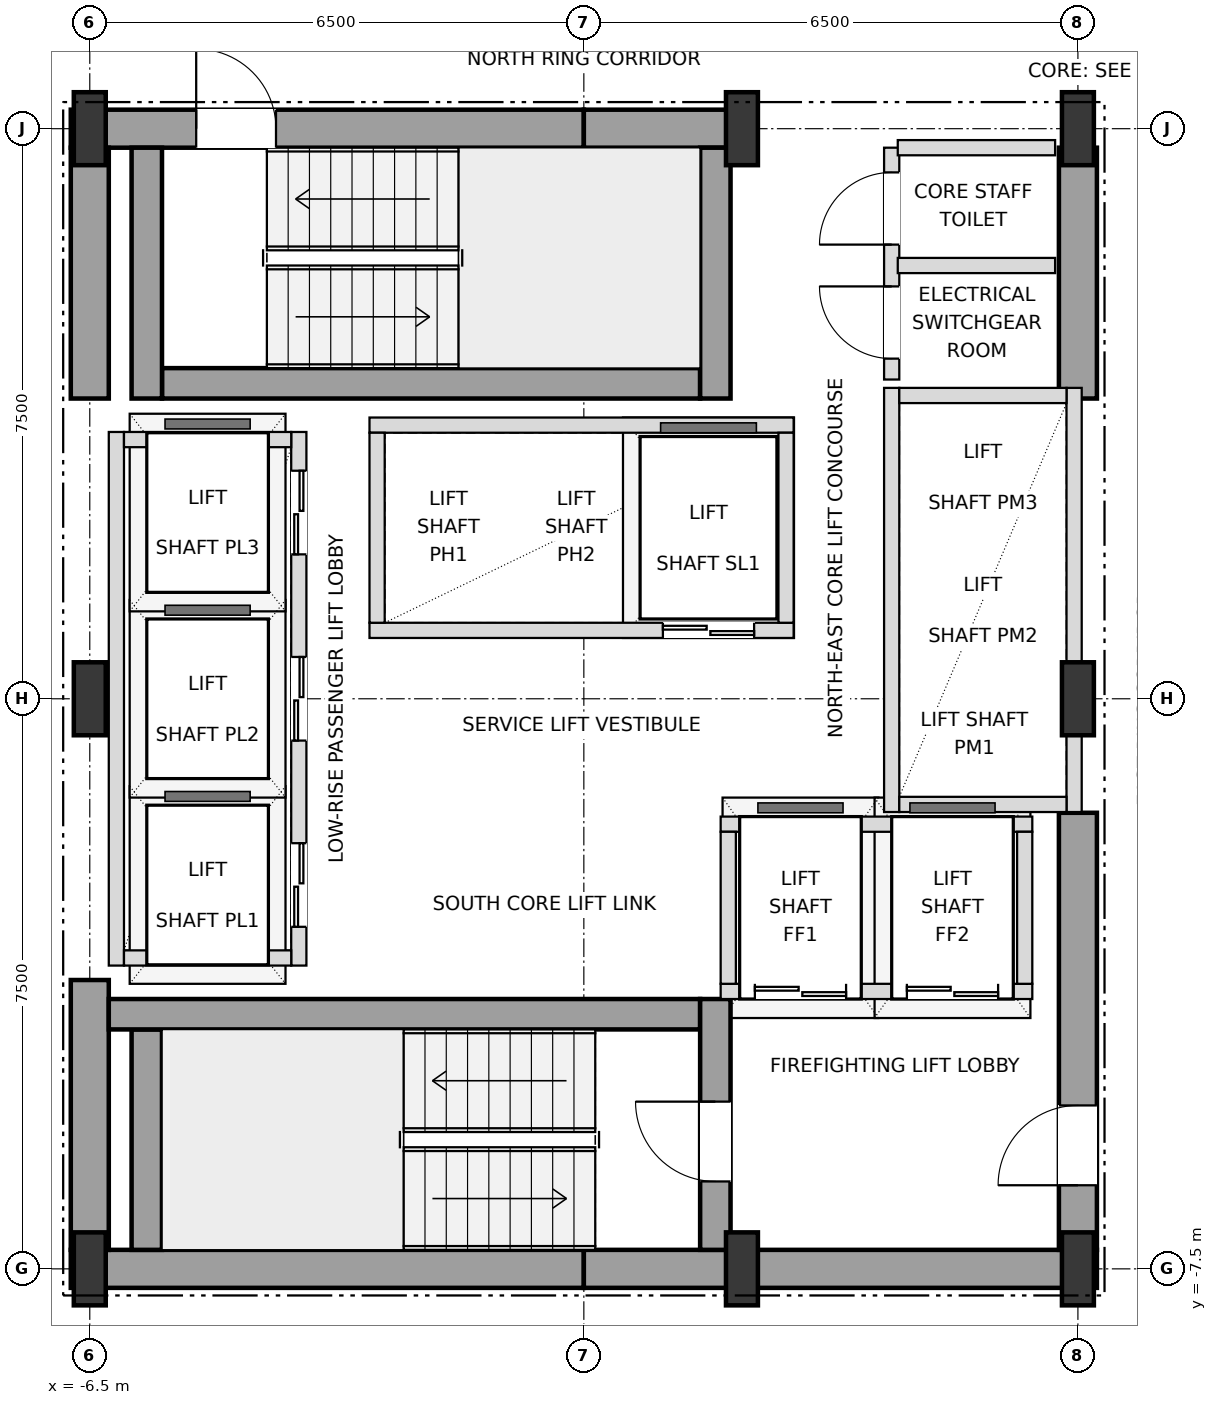
"""IFC4 building model, lengths in metres.
Left out: names, types, materials, properties, quantities, classifications, styles, units other than length and angle.
Written with IfcOpenShell. Run it as: python <this file> out.ifc"""

import sys

from ifc_helpers import new_model, si_unit, direction, frame, frame_2d, origin, origin_2d, place, context, subcontext, project, spatial, rectangle, i_section, extrude, element, fill, save


model = new_model("IFC4")
c1 = context("Model", 3, precision=1e-05, world=origin(), true_north=direction((0.0, 1.0)))
c2 = subcontext(c1, "Body", "Model", "MODEL_VIEW")
j1 = project(units=[si_unit("LENGTHUNIT", "METRE"), si_unit("PLANEANGLEUNIT", "RADIAN")], contexts=[c1])
p1 = place(None, origin())
s1 = spatial("IfcSite", under=j1, at=p1, CompositionType="ELEMENT")
p2 = place(p1, origin())
s2 = spatial("IfcBuilding", under=s1, at=p2, CompositionType="ELEMENT")
p3 = place(p2, frame((0.0, 0.0, 75.6)))
s3 = spatial("IfcBuildingStorey", under=s2, at=p3, CompositionType="ELEMENT", Elevation=75.6)
for number, where, z_axis, x_axis in (
    (1, (-6.5, -7.5, 0.0), (0.0, 0.0, 1.0), (1.0, 0.0, 0.0)),
    (2, (2.08, -7.5, 0.0), (0.0, 0.0, 1.0), (1.0, 0.0, 0.0)),
    (3, (6.5, -7.5, 0.0), (0.0, 0.0, 1.0), (1.0, 0.0, 0.0)),
    (4, (-6.5, 0.0, 0.0), (0.0, 0.0, 1.0), (1.0, 0.0, 0.0)),
    (5, (6.5, 0.0, 0.0), (0.0, 0.0, 1.0), (1.0, 0.0, 0.0)),
    (6, (-6.5, 7.5, 0.0), (0.0, 0.0, 1.0), (1.0, 0.0, 0.0)),
    (7, (2.08, 7.5, 0.0), (0.0, 0.0, 1.0), (1.0, 0.0, 0.0)),
    (8, (6.5, 7.5, 0.0), (0.0, 0.0, 1.0), (1.0, 0.0, 0.0)),
):
    element("IfcColumn", number, at=place(p3, frame(where, z_axis=z_axis, x_axis=x_axis)), inside=s3, PredefinedType="COLUMN", context=c2, shape_type="SweptSolid", body=[
        extrude(i_section(OverallWidth=0.42, OverallDepth=0.96, WebThickness=0.022, FlangeThickness=0.034, at=origin_2d()), origin(), (0.0, 0.0, 1.0), 3.6),
    ])
for number, where, z_axis, x_axis in (
    (9, (-6.75, -7.5, 0.0), (0.0, 0.0, 1.0), (1.0, 0.0, 0.0)),
    (10, (0.0, -7.5, 0.0), (0.0, 0.0, 1.0), (1.0, 0.0, 0.0)),
):
    element("IfcWall", number, at=place(p3, frame(where, z_axis=z_axis, x_axis=x_axis)), inside=s3, PredefinedType="SHEAR", context=c2, shape_type="SweptSolid", body=[
        extrude(rectangle(XDim=6.75, YDim=0.5, at=frame_2d((3.375, 0.0))), origin(), (0.0, 0.0, 1.0), 3.38),
    ])
p4 = place(p3, frame((-6.75, 7.5, 0.0), z_axis=(0.0, 0.0, 1.0), x_axis=(1.0, 0.0, 0.0)))
e11 = element("IfcWall", 11, at=p4, inside=s3, PredefinedType="SHEAR", context=c2, shape_type="SweptSolid", body=[
    extrude(rectangle(XDim=6.75, YDim=0.5, at=frame_2d((3.375, 0.0))), origin(), (0.0, 0.0, 1.0), 3.38),
])
p5 = place(p4, frame((1.65, 0.0, 0.0)))
e12 = element("IfcOpeningElement", 12, at=p5, cuts=e11, PredefinedType="OPENING", context=c2, shape_type="SweptSolid", body=[
    extrude(rectangle(XDim=1.05, YDim=2.15, at=frame_2d((0.525, 1.075))), frame((0.0, 0.26, 0.0), z_axis=(0.0, -1.0, 0.0), x_axis=(1.0, 0.0, 0.0)), (0.0, 0.0, 1.0), 0.52),
])
p6 = place(p3, frame((0.0, 7.5, 0.0), z_axis=(0.0, 0.0, 1.0), x_axis=(1.0, 0.0, 0.0)))
e13 = element("IfcWall", 13, at=p6, inside=s3, PredefinedType="SHEAR", context=c2, shape_type="SweptSolid", body=[
    extrude(rectangle(XDim=2.08, YDim=0.5, at=frame_2d((1.04, 0.0))), origin(), (0.0, 0.0, 1.0), 3.38),
])
p7 = place(p3, frame((-6.5, -7.25, 0.0), z_axis=(0.0, 0.0, 1.0), x_axis=(0.0, 1.0, 0.0)))
e14 = element("IfcWall", 14, at=p7, inside=s3, PredefinedType="SHEAR", context=c2, shape_type="SweptSolid", body=[
    extrude(rectangle(XDim=3.55, YDim=0.5, at=frame_2d((1.775, 0.0))), origin(), (0.0, 0.0, 1.0), 3.38),
])
p8 = place(p3, frame((-6.5, 3.95, 0.0), z_axis=(0.0, 0.0, 1.0), x_axis=(0.0, 1.0, 0.0)))
e15 = element("IfcWall", 15, at=p8, inside=s3, PredefinedType="SHEAR", context=c2, shape_type="SweptSolid", body=[
    extrude(rectangle(XDim=3.3, YDim=0.5, at=frame_2d((1.65, 0.0))), origin(), (0.0, 0.0, 1.0), 3.38),
])
p9 = place(p3, frame((6.5, -7.25, 0.0), z_axis=(0.0, 0.0, 1.0), x_axis=(0.0, 1.0, 0.0)))
e16 = element("IfcWall", 16, at=p9, inside=s3, PredefinedType="SHEAR", context=c2, shape_type="SweptSolid", body=[
    extrude(rectangle(XDim=5.75, YDim=0.5, at=frame_2d((2.875, 0.0))), origin(), (0.0, 0.0, 1.0), 3.38),
])
p10 = place(p9, frame((0.85, 0.0, 0.0)))
e17 = element("IfcOpeningElement", 17, at=p10, cuts=e16, PredefinedType="OPENING", context=c2, shape_type="SweptSolid", body=[
    extrude(rectangle(XDim=1.05, YDim=2.15, at=frame_2d((0.525, 1.075))), frame((0.0, 0.26, 0.0), z_axis=(0.0, -1.0, 0.0), x_axis=(1.0, 0.0, 0.0)), (0.0, 0.0, 1.0), 0.52),
])
p11 = place(p3, frame((6.5, 3.95, 0.0), z_axis=(0.0, 0.0, 1.0), x_axis=(0.0, 1.0, 0.0)))
e18 = element("IfcWall", 18, at=p11, inside=s3, PredefinedType="SHEAR", context=c2, shape_type="SweptSolid", body=[
    extrude(rectangle(XDim=3.3, YDim=0.5, at=frame_2d((1.65, 0.0))), origin(), (0.0, 0.0, 1.0), 3.38),
])
p12 = place(p3, frame((-5.75, -7.25, 0.0), z_axis=(0.0, 0.0, 1.0), x_axis=(0.0, 1.0, 0.0)))
e19 = element("IfcWall", 19, at=p12, inside=s3, PredefinedType="SHEAR", context=c2, shape_type="SweptSolid", body=[
    extrude(rectangle(XDim=2.9, YDim=0.4, at=frame_2d((1.45, 0.0))), origin(), (0.0, 0.0, 1.0), 3.38),
])
p13 = place(p3, frame((-6.25, -4.15, 0.0), z_axis=(0.0, 0.0, 1.0), x_axis=(1.0, 0.0, 0.0)))
e20 = element("IfcWall", 20, at=p13, inside=s3, PredefinedType="SHEAR", context=c2, shape_type="SweptSolid", body=[
    extrude(rectangle(XDim=7.78, YDim=0.4, at=frame_2d((3.89, 0.0))), origin(), (0.0, 0.0, 1.0), 3.38),
])
p14 = place(p3, frame((1.73, -7.25, 0.0), z_axis=(0.0, 0.0, 1.0), x_axis=(0.0, 1.0, 0.0)))
e21 = element("IfcWall", 21, at=p14, inside=s3, PredefinedType="SHEAR", context=c2, shape_type="SweptSolid", body=[
    extrude(rectangle(XDim=3.3, YDim=0.4, at=frame_2d((1.65, 0.0))), origin(), (0.0, 0.0, 1.0), 3.38),
])
p15 = place(p14, frame((0.9, 0.0, 0.0)))
e22 = element("IfcOpeningElement", 22, at=p15, cuts=e21, PredefinedType="OPENING", context=c2, shape_type="SweptSolid", body=[
    extrude(rectangle(XDim=1.05, YDim=2.15, at=frame_2d((0.525, 1.075))), frame((0.0, 0.21, 0.0), z_axis=(0.0, -1.0, 0.0), x_axis=(1.0, 0.0, 0.0)), (0.0, 0.0, 1.0), 0.42),
])
p16 = place(p3, frame((-5.55, 4.15, 0.0), z_axis=(0.0, 0.0, 1.0), x_axis=(1.0, 0.0, 0.0)))
e23 = element("IfcWall", 23, at=p16, inside=s3, PredefinedType="SHEAR", context=c2, shape_type="SweptSolid", body=[
    extrude(rectangle(XDim=7.08, YDim=0.4, at=frame_2d((3.54, 0.0))), origin(), (0.0, 0.0, 1.0), 3.38),
])
for number, where, z_axis, x_axis in (
    (24, (1.73, 3.95, 0.0), (0.0, 0.0, 1.0), (0.0, 1.0, 0.0)),
    (25, (-5.75, 3.95, 0.0), (0.0, 0.0, 1.0), (0.0, 1.0, 0.0)),
):
    element("IfcWall", number, at=place(p3, frame(where, z_axis=z_axis, x_axis=x_axis)), inside=s3, PredefinedType="SHEAR", context=c2, shape_type="SweptSolid", body=[
        extrude(rectangle(XDim=3.3, YDim=0.4, at=frame_2d((1.65, 0.0))), origin(), (0.0, 0.0, 1.0), 3.38),
    ])
p17 = place(p3, frame((-3.75, -3.51, 0.0), z_axis=(0.0, 0.0, 1.0), x_axis=(0.0, 1.0, 0.0)))
e26 = element("IfcWall", 26, at=p17, inside=s3, PredefinedType="SOLIDWALL", context=c2, shape_type="SweptSolid", body=[
    extrude(rectangle(XDim=7.02, YDim=0.2, at=frame_2d((3.51, 0.0))), origin(), (0.0, 0.0, 1.0), 3.38),
])
p18 = place(p17, frame((0.51, 0.0, 0.0)))
e27 = element("IfcOpeningElement", 27, at=p18, cuts=e26, PredefinedType="OPENING", context=c2, shape_type="SweptSolid", body=[
    extrude(rectangle(XDim=1.1, YDim=2.15, at=frame_2d((0.55, 1.075))), frame((0.0, 0.11, 0.0), z_axis=(0.0, -1.0, 0.0), x_axis=(1.0, 0.0, 0.0)), (0.0, 0.0, 1.0), 0.22),
])
p19 = place(p17, frame((2.96, 0.0, 0.0)))
e28 = element("IfcOpeningElement", 28, at=p19, cuts=e26, PredefinedType="OPENING", context=c2, shape_type="SweptSolid", body=[
    extrude(rectangle(XDim=1.1, YDim=2.15, at=frame_2d((0.55, 1.075))), frame((0.0, 0.11, 0.0), z_axis=(0.0, -1.0, 0.0), x_axis=(1.0, 0.0, 0.0)), (0.0, 0.0, 1.0), 0.22),
])
p20 = place(p17, frame((5.41, 0.0, 0.0)))
e29 = element("IfcOpeningElement", 29, at=p20, cuts=e26, PredefinedType="OPENING", context=c2, shape_type="SweptSolid", body=[
    extrude(rectangle(XDim=1.1, YDim=2.15, at=frame_2d((0.55, 1.075))), frame((0.0, 0.11, 0.0), z_axis=(0.0, -1.0, 0.0), x_axis=(1.0, 0.0, 0.0)), (0.0, 0.0, 1.0), 0.22),
])
p21 = place(p3, frame((-6.15, -3.51, 0.0), z_axis=(0.0, 0.0, 1.0), x_axis=(0.0, 1.0, 0.0)))
e30 = element("IfcWall", 30, at=p21, inside=s3, PredefinedType="SOLIDWALL", context=c2, shape_type="SweptSolid", body=[
    extrude(rectangle(XDim=7.02, YDim=0.2, at=frame_2d((3.51, 0.0))), origin(), (0.0, 0.0, 1.0), 3.38),
])
for number, where, z_axis, x_axis in (
    (31, (-6.05, -3.41, 0.0), (0.0, 0.0, 1.0), (1.0, 0.0, 0.0)),
    (32, (-6.05, 3.41, 0.0), (0.0, 0.0, 1.0), (1.0, 0.0, 0.0)),
):
    element("IfcWall", number, at=place(p3, frame(where, z_axis=z_axis, x_axis=x_axis)), inside=s3, PredefinedType="SOLIDWALL", context=c2, shape_type="SweptSolid", body=[
        extrude(rectangle(XDim=2.2, YDim=0.2, at=frame_2d((1.1, 0.0))), origin(), (0.0, 0.0, 1.0), 3.38),
    ])
p22 = place(p3, frame((4.05, -1.49, 0.0), z_axis=(0.0, 0.0, 1.0), x_axis=(0.0, 1.0, 0.0)))
e33 = element("IfcWall", 33, at=p22, inside=s3, PredefinedType="SOLIDWALL", context=c2, shape_type="SweptSolid", body=[
    extrude(rectangle(XDim=5.58, YDim=0.2, at=frame_2d((2.79, 0.0))), origin(), (0.0, 0.0, 1.0), 3.38),
])
p23 = place(p3, frame((6.45, -1.49, 0.0), z_axis=(0.0, 0.0, 1.0), x_axis=(0.0, 1.0, 0.0)))
e34 = element("IfcWall", 34, at=p23, inside=s3, PredefinedType="SOLIDWALL", context=c2, shape_type="SweptSolid", body=[
    extrude(rectangle(XDim=5.58, YDim=0.2, at=frame_2d((2.79, 0.0))), origin(), (0.0, 0.0, 1.0), 2.816),
])
for number, where, z_axis, x_axis in (
    (35, (4.15, -1.39, 0.0), (0.0, 0.0, 1.0), (1.0, 0.0, 0.0)),
    (36, (4.15, 3.99, 0.0), (0.0, 0.0, 1.0), (1.0, 0.0, 0.0)),
):
    element("IfcWall", number, at=place(p3, frame(where, z_axis=z_axis, x_axis=x_axis)), inside=s3, PredefinedType="SOLIDWALL", context=c2, shape_type="SweptSolid", body=[
        extrude(rectangle(XDim=2.2, YDim=0.2, at=frame_2d((1.1, 0.0))), origin(), (0.0, 0.0, 1.0), 3.38),
    ])
p24 = place(p3, frame((-2.82, 0.9, 0.0), z_axis=(0.0, 0.0, 1.0), x_axis=(1.0, 0.0, 0.0)))
e37 = element("IfcWall", 37, at=p24, inside=s3, PredefinedType="SOLIDWALL", context=c2, shape_type="SweptSolid", body=[
    extrude(rectangle(XDim=5.58, YDim=0.2, at=frame_2d((2.79, 0.0))), origin(), (0.0, 0.0, 1.0), 3.38),
])
p25 = place(p24, frame((3.86, 0.0, 0.0)))
e38 = element("IfcOpeningElement", 38, at=p25, cuts=e37, PredefinedType="OPENING", context=c2, shape_type="SweptSolid", body=[
    extrude(rectangle(XDim=1.2, YDim=2.2, at=frame_2d((0.6, 1.1))), frame((0.0, 0.11, 0.0), z_axis=(0.0, -1.0, 0.0), x_axis=(1.0, 0.0, 0.0)), (0.0, 0.0, 1.0), 0.22),
])
p26 = place(p3, frame((-2.82, 3.6, 0.0), z_axis=(0.0, 0.0, 1.0), x_axis=(1.0, 0.0, 0.0)))
e39 = element("IfcWall", 39, at=p26, inside=s3, PredefinedType="SOLIDWALL", context=c2, shape_type="SweptSolid", body=[
    extrude(rectangle(XDim=5.58, YDim=0.2, at=frame_2d((2.79, 0.0))), origin(), (0.0, 0.0, 1.0), 3.38),
])
for number, where, z_axis, x_axis in (
    (40, (-2.72, 1.0, 0.0), (0.0, 0.0, 1.0), (0.0, 1.0, 0.0)),
    (41, (2.66, 1.0, 0.0), (0.0, 0.0, 1.0), (0.0, 1.0, 0.0)),
):
    element("IfcWall", number, at=place(p3, frame(where, z_axis=z_axis, x_axis=x_axis)), inside=s3, PredefinedType="SOLIDWALL", context=c2, shape_type="SweptSolid", body=[
        extrude(rectangle(XDim=2.5, YDim=0.2, at=frame_2d((1.25, 0.0))), origin(), (0.0, 0.0, 1.0), 3.38),
    ])
p27 = place(p3, frame((1.8, -3.85, 0.0), z_axis=(0.0, 0.0, 1.0), x_axis=(1.0, 0.0, 0.0)))
e42 = element("IfcWall", 42, at=p27, inside=s3, PredefinedType="SOLIDWALL", context=c2, shape_type="SweptSolid", body=[
    extrude(rectangle(XDim=4.1, YDim=0.2, at=frame_2d((2.05, 0.0))), origin(), (0.0, 0.0, 1.0), 3.38),
])
p28 = place(p27, frame((0.45, 0.0, 0.0)))
e43 = element("IfcOpeningElement", 43, at=p28, cuts=e42, PredefinedType="OPENING", context=c2, shape_type="SweptSolid", body=[
    extrude(rectangle(XDim=1.2, YDim=2.2, at=frame_2d((0.6, 1.1))), frame((0.0, 0.11, 0.0), z_axis=(0.0, -1.0, 0.0), x_axis=(1.0, 0.0, 0.0)), (0.0, 0.0, 1.0), 0.22),
])
p29 = place(p27, frame((2.45, 0.0, 0.0)))
e44 = element("IfcOpeningElement", 44, at=p29, cuts=e42, PredefinedType="OPENING", context=c2, shape_type="SweptSolid", body=[
    extrude(rectangle(XDim=1.2, YDim=2.2, at=frame_2d((0.6, 1.1))), frame((0.0, 0.11, 0.0), z_axis=(0.0, -1.0, 0.0), x_axis=(1.0, 0.0, 0.0)), (0.0, 0.0, 1.0), 0.22),
])
p30 = place(p3, frame((1.8, -1.65, 0.0), z_axis=(0.0, 0.0, 1.0), x_axis=(1.0, 0.0, 0.0)))
e45 = element("IfcWall", 45, at=p30, inside=s3, PredefinedType="SOLIDWALL", context=c2, shape_type="SweptSolid", body=[
    extrude(rectangle(XDim=4.1, YDim=0.2, at=frame_2d((2.05, 0.0))), origin(), (0.0, 0.0, 1.0), 3.38),
])
for number, where, z_axis, x_axis in (
    (46, (1.9, -3.75, 0.0), (0.0, 0.0, 1.0), (0.0, 1.0, 0.0)),
    (47, (5.8, -3.75, 0.0), (0.0, 0.0, 1.0), (0.0, 1.0, 0.0)),
):
    element("IfcWall", number, at=place(p3, frame(where, z_axis=z_axis, x_axis=x_axis)), inside=s3, PredefinedType="SOLIDWALL", context=c2, shape_type="SweptSolid", body=[
        extrude(rectangle(XDim=2.0, YDim=0.2, at=frame_2d((1.0, 0.0))), origin(), (0.0, 0.0, 1.0), 3.38),
    ])
p31 = place(p3, frame((4.05, 4.2, 0.0), z_axis=(0.0, 0.0, 1.0), x_axis=(0.0, 1.0, 0.0)))
e48 = element("IfcWall", 48, at=p31, inside=s3, PredefinedType="SOLIDWALL", context=c2, shape_type="SweptSolid", body=[
    extrude(rectangle(XDim=3.05, YDim=0.2, at=frame_2d((1.525, 0.0))), origin(), (0.0, 0.0, 1.0), 3.38),
])
p32 = place(p31, frame((0.275, 0.0, 0.0)))
e49 = element("IfcOpeningElement", 49, at=p32, cuts=e48, PredefinedType="OPENING", context=c2, shape_type="SweptSolid", body=[
    extrude(rectangle(XDim=0.95, YDim=2.15, at=frame_2d((0.475, 1.075))), frame((0.0, 0.11, 0.0), z_axis=(0.0, -1.0, 0.0), x_axis=(1.0, 0.0, 0.0)), (0.0, 0.0, 1.0), 0.22),
])
p33 = place(p31, frame((1.775, 0.0, 0.0)))
e50 = element("IfcOpeningElement", 50, at=p33, cuts=e48, PredefinedType="OPENING", context=c2, shape_type="SweptSolid", body=[
    extrude(rectangle(XDim=0.95, YDim=2.15, at=frame_2d((0.475, 1.075))), frame((0.0, 0.11, 0.0), z_axis=(0.0, -1.0, 0.0), x_axis=(1.0, 0.0, 0.0)), (0.0, 0.0, 1.0), 0.22),
])
for number, where, z_axis, x_axis in (
    (51, (4.13, 5.7, 0.0), (0.0, 0.0, 1.0), (1.0, 0.0, 0.0)),
    (52, (4.13, 7.25, 0.0), (0.0, 0.0, 1.0), (1.0, 0.0, 0.0)),
):
    element("IfcWall", number, at=place(p3, frame(where, z_axis=z_axis, x_axis=x_axis)), inside=s3, PredefinedType="SOLIDWALL", context=c2, shape_type="SweptSolid", body=[
        extrude(rectangle(XDim=2.07, YDim=0.2, at=frame_2d((1.035, 0.0))), origin(), (0.0, 0.0, 1.0), 3.38),
    ])
p34 = place(p10, origin())
e53 = element("IfcDoor", 53, at=p34, inside=s3, OperationType="SINGLE_SWING_LEFT", PredefinedType="DOOR", context=c2, shape_type="SweptSolid", body=[
    extrude(rectangle(XDim=1.05, YDim=2.15, at=frame_2d((0.525, 1.075))), frame((0.0, 0.025, 0.0), z_axis=(0.0, -1.0, 0.0), x_axis=(1.0, 0.0, 0.0)), (0.0, 0.0, 1.0), 0.05),
])
fill(e17, e53)
p35 = place(p15, origin())
e54 = element("IfcDoor", 54, at=p35, inside=s3, OperationType="SINGLE_SWING_RIGHT", PredefinedType="DOOR", context=c2, shape_type="SweptSolid", body=[
    extrude(rectangle(XDim=1.05, YDim=2.15, at=frame_2d((0.525, 1.075))), frame((0.0, 0.025, 0.0), z_axis=(0.0, -1.0, 0.0), x_axis=(1.0, 0.0, 0.0)), (0.0, 0.0, 1.0), 0.05),
])
fill(e22, e54)
p36 = place(p5, origin())
e55 = element("IfcDoor", 55, at=p36, inside=s3, OperationType="SINGLE_SWING_LEFT", PredefinedType="DOOR", context=c2, shape_type="SweptSolid", body=[
    extrude(rectangle(XDim=1.05, YDim=2.15, at=frame_2d((0.525, 1.075))), frame((0.0, 0.025, 0.0), z_axis=(0.0, -1.0, 0.0), x_axis=(1.0, 0.0, 0.0)), (0.0, 0.0, 1.0), 0.05),
])
fill(e12, e55)
p37 = place(p18, origin())
e56 = element("IfcDoor", 56, at=p37, inside=s3, OperationType="DOUBLE_DOOR_SLIDING", PredefinedType="DOOR", context=c2, shape_type="SweptSolid", body=[
    extrude(rectangle(XDim=1.1, YDim=2.15, at=frame_2d((0.55, 1.075))), frame((0.0, 0.025, 0.0), z_axis=(0.0, -1.0, 0.0), x_axis=(1.0, 0.0, 0.0)), (0.0, 0.0, 1.0), 0.05),
])
fill(e27, e56)
p38 = place(p19, origin())
e57 = element("IfcDoor", 57, at=p38, inside=s3, OperationType="DOUBLE_DOOR_SLIDING", PredefinedType="DOOR", context=c2, shape_type="SweptSolid", body=[
    extrude(rectangle(XDim=1.1, YDim=2.15, at=frame_2d((0.55, 1.075))), frame((0.0, 0.025, 0.0), z_axis=(0.0, -1.0, 0.0), x_axis=(1.0, 0.0, 0.0)), (0.0, 0.0, 1.0), 0.05),
])
fill(e28, e57)
p39 = place(p20, origin())
e58 = element("IfcDoor", 58, at=p39, inside=s3, OperationType="DOUBLE_DOOR_SLIDING", PredefinedType="DOOR", context=c2, shape_type="SweptSolid", body=[
    extrude(rectangle(XDim=1.1, YDim=2.15, at=frame_2d((0.55, 1.075))), frame((0.0, 0.025, 0.0), z_axis=(0.0, -1.0, 0.0), x_axis=(1.0, 0.0, 0.0)), (0.0, 0.0, 1.0), 0.05),
])
fill(e29, e58)
p40 = place(p25, origin())
e59 = element("IfcDoor", 59, at=p40, inside=s3, OperationType="DOUBLE_DOOR_SLIDING", PredefinedType="DOOR", context=c2, shape_type="SweptSolid", body=[
    extrude(rectangle(XDim=1.2, YDim=2.2, at=frame_2d((0.6, 1.1))), frame((0.0, 0.025, 0.0), z_axis=(0.0, -1.0, 0.0), x_axis=(1.0, 0.0, 0.0)), (0.0, 0.0, 1.0), 0.05),
])
fill(e38, e59)
p41 = place(p28, origin())
e60 = element("IfcDoor", 60, at=p41, inside=s3, OperationType="DOUBLE_DOOR_SLIDING", PredefinedType="DOOR", context=c2, shape_type="SweptSolid", body=[
    extrude(rectangle(XDim=1.2, YDim=2.2, at=frame_2d((0.6, 1.1))), frame((0.0, 0.025, 0.0), z_axis=(0.0, -1.0, 0.0), x_axis=(1.0, 0.0, 0.0)), (0.0, 0.0, 1.0), 0.05),
])
fill(e43, e60)
p42 = place(p29, origin())
e61 = element("IfcDoor", 61, at=p42, inside=s3, OperationType="DOUBLE_DOOR_SLIDING", PredefinedType="DOOR", context=c2, shape_type="SweptSolid", body=[
    extrude(rectangle(XDim=1.2, YDim=2.2, at=frame_2d((0.6, 1.1))), frame((0.0, 0.025, 0.0), z_axis=(0.0, -1.0, 0.0), x_axis=(1.0, 0.0, 0.0)), (0.0, 0.0, 1.0), 0.05),
])
fill(e44, e61)
p43 = place(p32, origin())
e62 = element("IfcDoor", 62, at=p43, inside=s3, OperationType="SINGLE_SWING_RIGHT", PredefinedType="DOOR", context=c2, shape_type="SweptSolid", body=[
    extrude(rectangle(XDim=0.95, YDim=2.15, at=frame_2d((0.475, 1.075))), frame((0.0, 0.025, 0.0), z_axis=(0.0, -1.0, 0.0), x_axis=(1.0, 0.0, 0.0)), (0.0, 0.0, 1.0), 0.05),
])
fill(e49, e62)
p44 = place(p33, origin())
e63 = element("IfcDoor", 63, at=p44, inside=s3, OperationType="SINGLE_SWING_LEFT", PredefinedType="DOOR", context=c2, shape_type="SweptSolid", body=[
    extrude(rectangle(XDim=0.95, YDim=2.15, at=frame_2d((0.475, 1.075))), frame((0.0, 0.025, 0.0), z_axis=(0.0, -1.0, 0.0), x_axis=(1.0, 0.0, 0.0)), (0.0, 0.0, 1.0), 0.05),
])
fill(e50, e63)
save(model, sys.argv[1])
